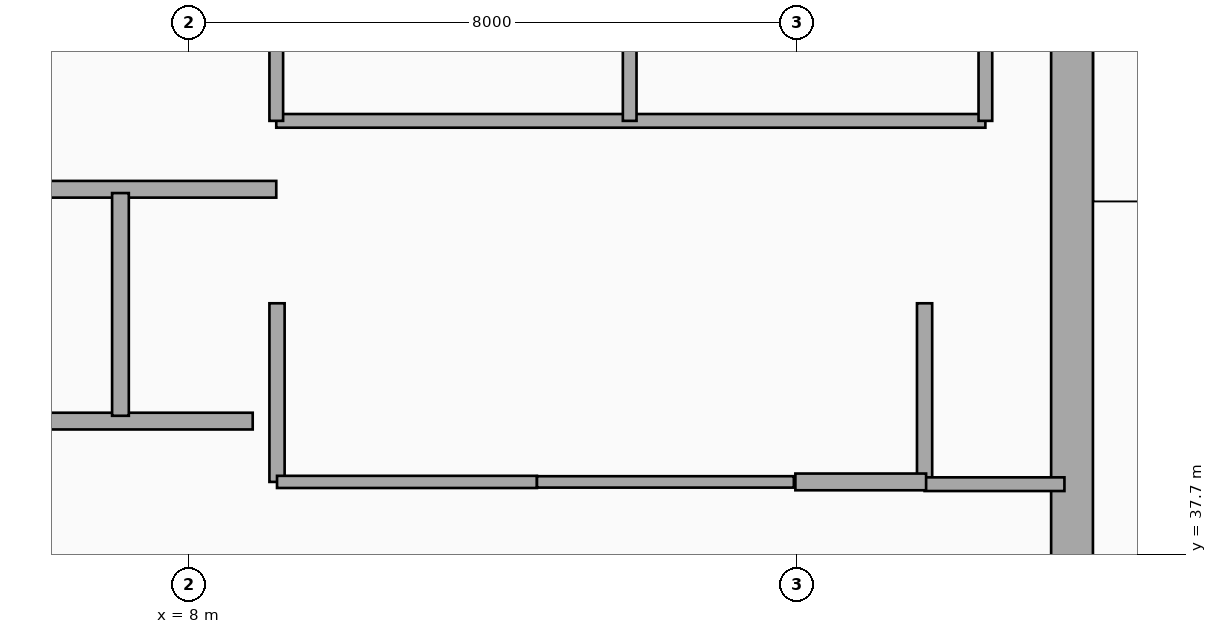
"""IFC4 building model, lengths in metres.
Left out: names, types, materials, properties, quantities, classifications, styles, units other than length and angle.
Written with IfcOpenShell. Run it as: python <this file> out.ifc"""

import sys

from ifc_helpers import new_model, si_unit, direction, frame, frame_2d, origin, place, context, subcontext, project, spatial, rectangle, extrude, element, fill, save


model = new_model("IFC4")
c1 = context("Model", 3, precision=1e-05, world=origin(), true_north=direction((0.0, 1.0)))
c2 = subcontext(c1, "Body", "Model", "MODEL_VIEW")
j1 = project(units=[si_unit("LENGTHUNIT", "METRE"), si_unit("PLANEANGLEUNIT", "RADIAN")], contexts=[c1])
p1 = place(None, origin())
s1 = spatial("IfcSite", under=j1, at=p1, CompositionType="ELEMENT")
p2 = place(p1, origin())
s2 = spatial("IfcBuilding", under=s1, at=p2, CompositionType="ELEMENT")
p3 = place(p2, frame((0.0, 0.0, 347.49)))
s3 = spatial("IfcBuildingStorey", under=s2, at=p3, CompositionType="ELEMENT", Elevation=347.49)
p4 = place(p3, frame((19.62, 37.15, 0.0), z_axis=(0.0, 0.0, 1.0), x_axis=(0.0, 1.0, 0.0)))
e1 = element("IfcWall", 1, at=p4, inside=s3, PredefinedType="SHEAR", context=c2, shape_type="SweptSolid", body=[
    extrude(rectangle(XDim=7.89, YDim=0.55, at=frame_2d((3.945, 0.0))), origin(), (0.0, 0.0, 1.0), 4.62),
])
p5 = place(p3, frame((5.38, 39.45, 0.0), z_axis=(0.0, 0.0, 1.0), x_axis=(1.0, 0.0, 0.0)))
e2 = element("IfcWall", 2, at=p5, inside=s3, PredefinedType="PARTITIONING", context=c2, shape_type="SweptSolid", body=[
    extrude(rectangle(XDim=3.46, YDim=0.22, at=frame_2d((1.73, 0.0))), origin(), (0.0, 0.0, 1.0), 4.37),
])
p6 = place(p3, frame((5.38, 42.5, 0.0), z_axis=(0.0, 0.0, 1.0), x_axis=(1.0, 0.0, 0.0)))
e3 = element("IfcWall", 3, at=p6, inside=s3, PredefinedType="PARTITIONING", context=c2, shape_type="SweptSolid", body=[
    extrude(rectangle(XDim=3.77, YDim=0.22, at=frame_2d((1.885, 0.0))), origin(), (0.0, 0.0, 1.0), 4.37),
])
p7 = place(p6, frame((1.75, 0.0, 0.0), z_axis=(0.0, 0.0, 1.0), x_axis=(-1.0, 0.0, 0.0)))
e4 = element("IfcOpeningElement", 4, at=p7, cuts=e3, PredefinedType="OPENING", context=c2, shape_type="SweptSolid", body=[
    extrude(rectangle(XDim=1.4, YDim=2.2, at=frame_2d((0.7, 1.1))), frame((0.0, 0.12, 0.0), z_axis=(0.0, -1.0, 0.0), x_axis=(1.0, 0.0, 0.0)), (0.0, 0.0, 1.0), 0.24),
])
p8 = place(p6, frame((3.53, 0.0, 0.0), z_axis=(0.0, 0.0, 1.0), x_axis=(-1.0, 0.0, 0.0)))
e5 = element("IfcOpeningElement", 5, at=p8, cuts=e3, PredefinedType="OPENING", context=c2, shape_type="SweptSolid", body=[
    extrude(rectangle(XDim=1.4, YDim=2.2, at=frame_2d((0.7, 1.1))), frame((0.0, 0.12, 0.0), z_axis=(0.0, -1.0, 0.0), x_axis=(1.0, 0.0, 0.0)), (0.0, 0.0, 1.0), 0.24),
])
p9 = place(p3, frame((7.1, 39.52, 0.0), z_axis=(0.0, 0.0, 1.0), x_axis=(0.0, 1.0, 0.0)))
e6 = element("IfcWall", 6, at=p9, inside=s3, PredefinedType="PARTITIONING", context=c2, shape_type="SweptSolid", body=[
    extrude(rectangle(XDim=2.93, YDim=0.22, at=frame_2d((1.465, 0.0))), origin(), (0.0, 0.0, 1.0), 4.37),
])
for number, where, z_axis, x_axis in (
    (7, (9.16, 38.65, 0.0), (0.0, 0.0, 1.0), (0.0, 1.0, 0.0)),
    (8, (17.68, 38.65, 0.0), (0.0, 0.0, 1.0), (0.0, 1.0, 0.0)),
):
    element("IfcWall", number, at=place(p3, frame(where, z_axis=z_axis, x_axis=x_axis)), inside=s3, PredefinedType="PARTITIONING", context=c2, shape_type="SweptSolid", body=[
        extrude(rectangle(XDim=2.35, YDim=0.2, at=frame_2d((1.175, 0.0))), origin(), (0.0, 0.0, 1.0), 4.37),
    ])
p10 = place(p3, frame((17.68, 38.62, 0.0), z_axis=(0.0, 0.0, 1.0), x_axis=(1.0, 0.0, 0.0)))
e9 = element("IfcWall", 9, at=p10, inside=s3, PredefinedType="PARTITIONING", context=c2, shape_type="SweptSolid", body=[
    extrude(rectangle(XDim=1.84, YDim=0.18, at=frame_2d((0.92, 0.0))), origin(), (0.0, 0.0, 1.0), 4.37),
])
p11 = place(p10, frame((0.24, 0.0, 0.0)))
e10 = element("IfcOpeningElement", 10, at=p11, cuts=e9, PredefinedType="OPENING", context=c2, shape_type="SweptSolid", body=[
    extrude(rectangle(XDim=0.92, YDim=2.1, at=frame_2d((0.46, 1.05))), frame((0.0, 0.1, 0.0), z_axis=(0.0, -1.0, 0.0), x_axis=(1.0, 0.0, 0.0)), (0.0, 0.0, 1.0), 0.2),
])
p12 = place(p3, frame((9.16, 38.65, 0.0), z_axis=(0.0, 0.0, 1.0), x_axis=(1.0, 0.0, 0.0)))
e11 = element("IfcWall", 11, at=p12, inside=s3, PredefinedType="PARTITIONING", context=c2, shape_type="SweptSolid", body=[
    extrude(rectangle(XDim=3.42, YDim=0.16, at=frame_2d((1.71, 0.0))), origin(), (0.0, 0.0, 1.0), 4.37),
])
p13 = place(p12, frame((2.15, 0.0, 0.0), z_axis=(0.0, 0.0, 1.0), x_axis=(-1.0, 0.0, 0.0)))
e12 = element("IfcOpeningElement", 12, at=p13, cuts=e11, PredefinedType="OPENING", context=c2, shape_type="SweptSolid", body=[
    extrude(rectangle(XDim=0.95, YDim=2.15, at=frame_2d((0.475, 1.075))), frame((0.0, 0.09, 0.0), z_axis=(0.0, -1.0, 0.0), x_axis=(1.0, 0.0, 0.0)), (0.0, 0.0, 1.0), 0.18),
])
p14 = place(p3, frame((12.58, 38.65, 0.0), z_axis=(0.0, 0.0, 1.0), x_axis=(1.0, 0.0, 0.0)))
e13 = element("IfcWall", 13, at=p14, inside=s3, PredefinedType="PARTITIONING", context=c2, shape_type="SweptSolid", body=[
    extrude(rectangle(XDim=3.38, YDim=0.15, at=frame_2d((1.69, 0.0))), origin(), (0.0, 0.0, 1.0), 4.37),
])
p15 = place(p14, frame((2.2, 0.0, 0.0), z_axis=(0.0, 0.0, 1.0), x_axis=(-1.0, 0.0, 0.0)))
e14 = element("IfcOpeningElement", 14, at=p15, cuts=e13, PredefinedType="OPENING", context=c2, shape_type="SweptSolid", body=[
    extrude(rectangle(XDim=1.05, YDim=2.15, at=frame_2d((0.525, 1.075))), frame((0.0, 0.085, 0.0), z_axis=(0.0, -1.0, 0.0), x_axis=(1.0, 0.0, 0.0)), (0.0, 0.0, 1.0), 0.17),
])
p16 = place(p3, frame((15.98, 38.65, 0.0), z_axis=(0.0, 0.0, 1.0), x_axis=(1.0, 0.0, 0.0)))
e15 = element("IfcWall", 15, at=p16, inside=s3, PredefinedType="PARTITIONING", context=c2, shape_type="SweptSolid", body=[
    extrude(rectangle(XDim=1.72, YDim=0.22, at=frame_2d((0.86, 0.0))), origin(), (0.0, 0.0, 1.0), 4.37),
])
p17 = place(p3, frame((9.15, 43.4, 0.0), z_axis=(0.0, 0.0, 1.0), x_axis=(1.0, 0.0, 0.0)))
e16 = element("IfcWall", 16, at=p17, inside=s3, PredefinedType="PLUMBINGWALL", context=c2, shape_type="SweptSolid", body=[
    extrude(rectangle(XDim=9.33, YDim=0.18, at=frame_2d((4.665, 0.0))), origin(), (0.0, 0.0, 1.0), 4.37),
])
p18 = place(p17, frame((1.88, 0.0, 0.0)))
e17 = element("IfcOpeningElement", 17, at=p18, cuts=e16, PredefinedType="OPENING", context=c2, shape_type="SweptSolid", body=[
    extrude(rectangle(XDim=0.92, YDim=2.1, at=frame_2d((0.46, 1.05))), frame((0.0, 0.1, 0.0), z_axis=(0.0, -1.0, 0.0), x_axis=(1.0, 0.0, 0.0)), (0.0, 0.0, 1.0), 0.2),
])
p19 = place(p17, frame((6.515, 0.0, 0.0)))
e18 = element("IfcOpeningElement", 18, at=p19, cuts=e16, PredefinedType="OPENING", context=c2, shape_type="SweptSolid", body=[
    extrude(rectangle(XDim=0.92, YDim=2.1, at=frame_2d((0.46, 1.05))), frame((0.0, 0.1, 0.0), z_axis=(0.0, -1.0, 0.0), x_axis=(1.0, 0.0, 0.0)), (0.0, 0.0, 1.0), 0.2),
])
for number, where, z_axis, x_axis in (
    (19, (9.15, 43.4, 0.0), (0.0, 0.0, 1.0), (0.0, 1.0, 0.0)),
    (20, (18.48, 43.4, 0.0), (0.0, 0.0, 1.0), (0.0, 1.0, 0.0)),
    (21, (13.8, 43.4, 0.0), (0.0, 0.0, 1.0), (0.0, 1.0, 0.0)),
):
    element("IfcWall", number, at=place(p3, frame(where, z_axis=z_axis, x_axis=x_axis)), inside=s3, PredefinedType="PLUMBINGWALL", context=c2, shape_type="SweptSolid", body=[
        extrude(rectangle(XDim=1.88, YDim=0.18, at=frame_2d((0.94, 0.0))), origin(), (0.0, 0.0, 1.0), 4.37),
    ])
p20 = place(p7, origin())
e22 = element("IfcDoor", 22, at=p20, inside=s3, OperationType="SLIDING_TO_LEFT", PredefinedType="DOOR", context=c2, shape_type="SweptSolid", body=[
    extrude(rectangle(XDim=1.4, YDim=2.2, at=frame_2d((0.7, 1.1))), frame((0.0, 0.025, 0.0), z_axis=(0.0, -1.0, 0.0), x_axis=(1.0, 0.0, 0.0)), (0.0, 0.0, 1.0), 0.05),
])
fill(e4, e22)
p21 = place(p8, origin())
e23 = element("IfcDoor", 23, at=p21, inside=s3, OperationType="SLIDING_TO_LEFT", PredefinedType="DOOR", context=c2, shape_type="SweptSolid", body=[
    extrude(rectangle(XDim=1.4, YDim=2.2, at=frame_2d((0.7, 1.1))), frame((0.0, 0.025, 0.0), z_axis=(0.0, -1.0, 0.0), x_axis=(1.0, 0.0, 0.0)), (0.0, 0.0, 1.0), 0.05),
])
fill(e5, e23)
p22 = place(p11, origin())
e24 = element("IfcDoor", 24, at=p22, inside=s3, OperationType="SINGLE_SWING_LEFT", PredefinedType="DOOR", context=c2, shape_type="SweptSolid", body=[
    extrude(rectangle(XDim=0.92, YDim=2.1, at=frame_2d((0.46, 1.05))), frame((0.0, 0.025, 0.0), z_axis=(0.0, -1.0, 0.0), x_axis=(1.0, 0.0, 0.0)), (0.0, 0.0, 1.0), 0.05),
])
fill(e10, e24)
p23 = place(p13, origin())
e25 = element("IfcDoor", 25, at=p23, inside=s3, OperationType="SINGLE_SWING_RIGHT", PredefinedType="DOOR", context=c2, shape_type="SweptSolid", body=[
    extrude(rectangle(XDim=0.95, YDim=2.15, at=frame_2d((0.475, 1.075))), frame((0.0, 0.025, 0.0), z_axis=(0.0, -1.0, 0.0), x_axis=(1.0, 0.0, 0.0)), (0.0, 0.0, 1.0), 0.05),
])
fill(e12, e25)
p24 = place(p15, origin())
e26 = element("IfcDoor", 26, at=p24, inside=s3, OperationType="SINGLE_SWING_RIGHT", PredefinedType="DOOR", context=c2, shape_type="SweptSolid", body=[
    extrude(rectangle(XDim=1.05, YDim=2.15, at=frame_2d((0.525, 1.075))), frame((0.0, 0.025, 0.0), z_axis=(0.0, -1.0, 0.0), x_axis=(1.0, 0.0, 0.0)), (0.0, 0.0, 1.0), 0.05),
])
fill(e14, e26)
p25 = place(p18, origin())
e27 = element("IfcDoor", 27, at=p25, inside=s3, OperationType="SINGLE_SWING_LEFT", PredefinedType="DOOR", context=c2, shape_type="SweptSolid", body=[
    extrude(rectangle(XDim=0.92, YDim=2.1, at=frame_2d((0.46, 1.05))), frame((0.0, 0.025, 0.0), z_axis=(0.0, -1.0, 0.0), x_axis=(1.0, 0.0, 0.0)), (0.0, 0.0, 1.0), 0.05),
])
fill(e17, e27)
p26 = place(p19, origin())
e28 = element("IfcDoor", 28, at=p26, inside=s3, OperationType="SINGLE_SWING_RIGHT", PredefinedType="DOOR", context=c2, shape_type="SweptSolid", body=[
    extrude(rectangle(XDim=0.92, YDim=2.1, at=frame_2d((0.46, 1.05))), frame((0.0, 0.025, 0.0), z_axis=(0.0, -1.0, 0.0), x_axis=(1.0, 0.0, 0.0)), (0.0, 0.0, 1.0), 0.05),
])
fill(e18, e28)
save(model, sys.argv[1])
